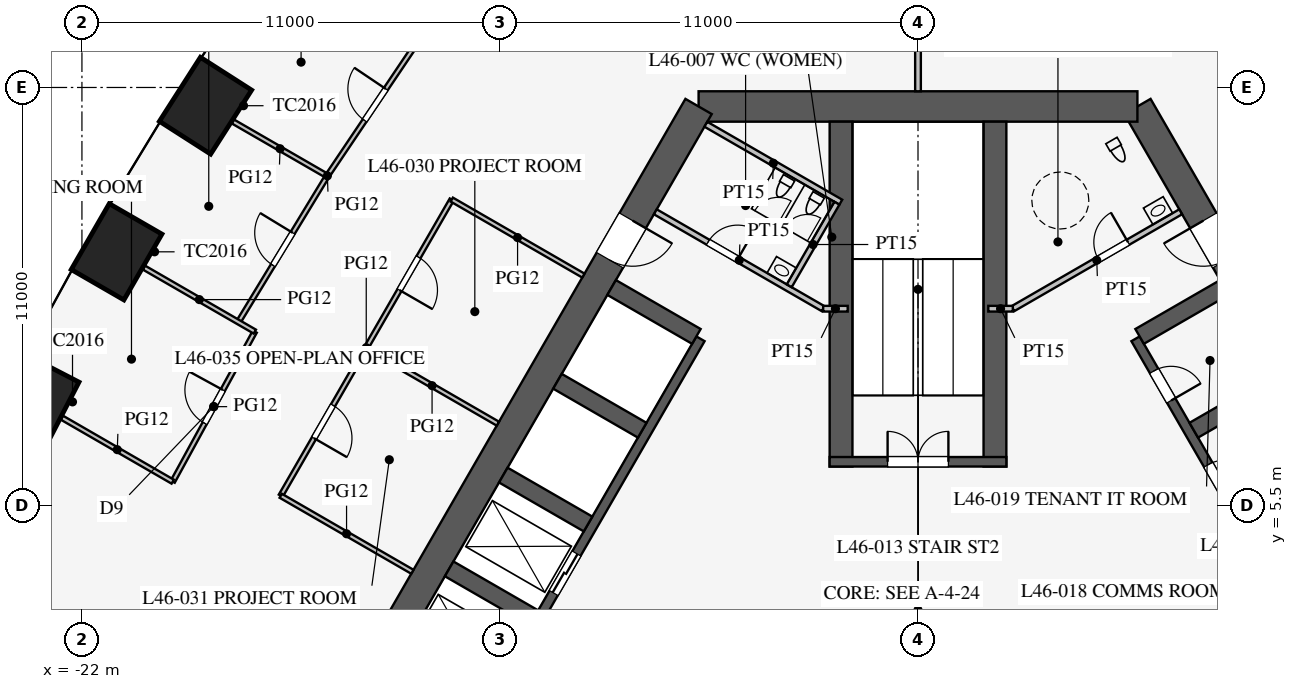
"""IFC4 building model, lengths in metres.
Left out: names, types, materials, properties, quantities, classifications, styles, units other than length and angle.
Written with IfcOpenShell. Run it as: python <this file> out.ifc"""

import sys

from ifc_helpers import new_model, si_unit, direction, frame, frame_2d, origin, origin_2d, place, context, subcontext, project, spatial, rectangle, extrude, element, fill, save


model = new_model("IFC4")
c1 = context("Model", 3, precision=1e-05, world=origin(), true_north=direction((0.0, 1.0)))
c2 = subcontext(c1, "Body", "Model", "MODEL_VIEW")
j1 = project(units=[si_unit("LENGTHUNIT", "METRE"), si_unit("PLANEANGLEUNIT", "RADIAN")], contexts=[c1])
p1 = place(None, origin())
s1 = spatial("IfcSite", under=j1, at=p1, CompositionType="ELEMENT")
p2 = place(p1, origin())
s2 = spatial("IfcBuilding", under=s1, at=p2, CompositionType="ELEMENT")
p3 = place(p2, frame((0.0, 0.0, 202.3)))
s3 = spatial("IfcBuildingStorey", under=s2, at=p3, CompositionType="ELEMENT", Elevation=202.3)
for number, where, z_axis, x_axis in (
    (1, (-18.748, 16.02, 0.0), (0.0, 0.0, 1.0), (-0.539, -0.842, 0.0)),
    (2, (-21.088, 12.175, 0.0), (0.0, 0.0, 1.0), (-0.5, -0.866, 0.0)),
    (3, (-23.248, 8.226, 0.0), (0.0, 0.0, 1.0), (-0.46, -0.888, 0.0)),
):
    element("IfcColumn", number, at=place(p3, frame(where, z_axis=z_axis, x_axis=x_axis)), inside=s3, PredefinedType="COLUMN", context=c2, shape_type="SweptSolid", body=[
        extrude(rectangle(XDim=2.0, YDim=1.6, at=origin_2d()), origin(), (0.0, 0.0, 1.0), 4.2),
    ])
p4 = place(p3, frame((16.743, -3.0, 0.0), z_axis=(0.0, 0.0, 1.0), x_axis=(-0.500002442456, 0.866023993627, 0.0)))
e4 = element("IfcWall", 4, at=p4, inside=s3, PredefinedType="SHEAR", context=c2, shape_type="SweptSolid", body=[
    extrude(rectangle(XDim=21.939, YDim=0.8, at=frame_2d((10.97, 0.0))), origin(), (0.0, 0.0, 1.0), 4.2),
])
p5 = place(p4, frame((17.27, 0.0, 0.0)))
e5 = element("IfcOpeningElement", 5, at=p5, cuts=e4, PredefinedType="OPENING", context=c2, shape_type="SweptSolid", body=[
    extrude(rectangle(XDim=1.2, YDim=2.1, at=frame_2d((0.6, 1.05))), frame((0.0, 0.41, 0.0), z_axis=(0.0, -1.0, 0.0), x_axis=(1.0, 0.0, 0.0)), (0.0, 0.0, 1.0), 0.82),
])
p6 = place(p4, frame((3.47, 0.0, 0.0)))
e6 = element("IfcOpeningElement", 6, at=p6, cuts=e4, PredefinedType="OPENING", context=c2, shape_type="SweptSolid", body=[
    extrude(rectangle(XDim=1.2, YDim=2.1, at=frame_2d((0.6, 1.05))), frame((0.0, 0.41, 0.0), z_axis=(0.0, -1.0, 0.0), x_axis=(1.0, 0.0, 0.0)), (0.0, 0.0, 1.0), 0.82),
])
p7 = place(p3, frame((5.773, 16.0, 0.0), z_axis=(0.0, 0.0, 1.0), x_axis=(-1.0, 0.0, 0.0)))
e7 = element("IfcWall", 7, at=p7, inside=s3, PredefinedType="SHEAR", context=c2, shape_type="SweptSolid", body=[
    extrude(rectangle(XDim=11.547, YDim=0.8, at=frame_2d((5.773, 0.0))), origin(), (0.0, 0.0, 1.0), 4.2),
])
p8 = place(p3, frame((-5.773, 16.0, 0.0), z_axis=(0.0, 0.0, 1.0), x_axis=(-0.500002442456, -0.866023993627, 0.0)))
e8 = element("IfcWall", 8, at=p8, inside=s3, PredefinedType="SHEAR", context=c2, shape_type="SweptSolid", body=[
    extrude(rectangle(XDim=21.939, YDim=0.8, at=frame_2d((10.97, 0.0))), origin(), (0.0, 0.0, 1.0), 4.2),
])
p9 = place(p8, frame((17.27, 0.0, 0.0)))
e9 = element("IfcOpeningElement", 9, at=p9, cuts=e8, PredefinedType="OPENING", context=c2, shape_type="SweptSolid", body=[
    extrude(rectangle(XDim=1.2, YDim=2.1, at=frame_2d((0.6, 1.05))), frame((0.0, 0.41, 0.0), z_axis=(0.0, -1.0, 0.0), x_axis=(1.0, 0.0, 0.0)), (0.0, 0.0, 1.0), 0.82),
])
p10 = place(p8, frame((3.47, 0.0, 0.0)))
e10 = element("IfcOpeningElement", 10, at=p10, cuts=e8, PredefinedType="OPENING", context=c2, shape_type="SweptSolid", body=[
    extrude(rectangle(XDim=1.2, YDim=2.1, at=frame_2d((0.6, 1.05))), frame((0.0, 0.41, 0.0), z_axis=(0.0, -1.0, 0.0), x_axis=(1.0, 0.0, 0.0)), (0.0, 0.0, 1.0), 0.82),
])
p11 = place(p3, frame((11.424, 0.014, 0.0), z_axis=(0.0, 0.0, 1.0), x_axis=(-0.500001763848, 0.866024385424, 0.0)))
e11 = element("IfcWall", 11, at=p11, inside=s3, PredefinedType="SHEAR", context=c2, shape_type="SweptSolid", body=[
    extrude(rectangle(XDim=11.4, YDim=0.25, at=frame_2d((5.7, 0.0))), origin(), (0.0, 0.0, 1.0), 4.2),
])
p12 = place(p11, frame((0.975, 0.0, 0.0)))
e12 = element("IfcOpeningElement", 12, at=p12, cuts=e11, PredefinedType="OPENING", context=c2, shape_type="SweptSolid", body=[
    extrude(rectangle(XDim=0.9, YDim=2.1, at=frame_2d((0.45, 1.05))), frame((0.0, 0.135, 0.0), z_axis=(0.0, -1.0, 0.0), x_axis=(1.0, 0.0, 0.0)), (0.0, 0.0, 1.0), 0.27),
])
p13 = place(p11, frame((3.825, 0.0, 0.0)))
e13 = element("IfcOpeningElement", 13, at=p13, cuts=e11, PredefinedType="OPENING", context=c2, shape_type="SweptSolid", body=[
    extrude(rectangle(XDim=0.9, YDim=2.1, at=frame_2d((0.45, 1.05))), frame((0.0, 0.135, 0.0), z_axis=(0.0, -1.0, 0.0), x_axis=(1.0, 0.0, 0.0)), (0.0, 0.0, 1.0), 0.27),
])
p14 = place(p11, frame((6.675, 0.0, 0.0)))
e14 = element("IfcOpeningElement", 14, at=p14, cuts=e11, PredefinedType="OPENING", context=c2, shape_type="SweptSolid", body=[
    extrude(rectangle(XDim=0.9, YDim=2.1, at=frame_2d((0.45, 1.05))), frame((0.0, 0.135, 0.0), z_axis=(0.0, -1.0, 0.0), x_axis=(1.0, 0.0, 0.0)), (0.0, 0.0, 1.0), 0.27),
])
p15 = place(p11, frame((9.525, 0.0, 0.0)))
e15 = element("IfcOpeningElement", 15, at=p15, cuts=e11, PredefinedType="OPENING", context=c2, shape_type="SweptSolid", body=[
    extrude(rectangle(XDim=0.9, YDim=2.1, at=frame_2d((0.45, 1.05))), frame((0.0, 0.135, 0.0), z_axis=(0.0, -1.0, 0.0), x_axis=(1.0, 0.0, 0.0)), (0.0, 0.0, 1.0), 0.27),
])
p16 = place(p3, frame((7.257, 7.481, 0.0), z_axis=(0.0, 0.0, 1.0), x_axis=(0.866046643894, 0.499963209246, 0.0)))
e16 = element("IfcWall", 16, at=p16, inside=s3, PredefinedType="SHEAR", context=c2, shape_type="SweptSolid", body=[
    extrude(rectangle(XDim=2.575, YDim=0.45, at=frame_2d((1.288, 0.0))), origin(), (0.0, 0.0, 1.0), 4.2),
])
p17 = place(p3, frame((5.832, 9.949, 0.0), z_axis=(0.0, 0.0, 1.0), x_axis=(0.866029291668, 0.499993265928, 0.0)))
e17 = element("IfcWall", 17, at=p17, inside=s3, PredefinedType="SHEAR", context=c2, shape_type="SweptSolid", body=[
    extrude(rectangle(XDim=2.575, YDim=0.45, at=frame_2d((1.288, 0.0))), origin(), (0.0, 0.0, 1.0), 4.2),
])
p18 = place(p3, frame((-5.724, 9.886, 0.0), z_axis=(0.0, 0.0, 1.0), x_axis=(-0.500001763848, -0.866024385424, 0.0)))
e18 = element("IfcWall", 18, at=p18, inside=s3, PredefinedType="SHEAR", context=c2, shape_type="SweptSolid", body=[
    extrude(rectangle(XDim=11.4, YDim=0.25, at=frame_2d((5.7, 0.0))), origin(), (0.0, 0.0, 1.0), 4.2),
])
p19 = place(p18, frame((6.525, 0.0, 0.0)))
e19 = element("IfcOpeningElement", 19, at=p19, cuts=e18, PredefinedType="OPENING", context=c2, shape_type="SweptSolid", body=[
    extrude(rectangle(XDim=1.2, YDim=2.2, at=frame_2d((0.6, 1.1))), frame((0.0, 0.135, 0.0), z_axis=(0.0, -1.0, 0.0), x_axis=(1.0, 0.0, 0.0)), (0.0, 0.0, 1.0), 0.27),
])
p20 = place(p18, frame((9.375, 0.0, 0.0)))
e20 = element("IfcOpeningElement", 20, at=p20, cuts=e18, PredefinedType="OPENING", context=c2, shape_type="SweptSolid", body=[
    extrude(rectangle(XDim=1.2, YDim=2.2, at=frame_2d((0.6, 1.1))), frame((0.0, 0.135, 0.0), z_axis=(0.0, -1.0, 0.0), x_axis=(1.0, 0.0, 0.0)), (0.0, 0.0, 1.0), 0.27),
])
p21 = place(p3, frame((-5.832, 9.949, 0.0), z_axis=(0.0, 0.0, 1.0), x_axis=(-0.866029291668, 0.499993265928, 0.0)))
e21 = element("IfcWall", 21, at=p21, inside=s3, PredefinedType="SHEAR", context=c2, shape_type="SweptSolid", body=[
    extrude(rectangle(XDim=2.575, YDim=0.45, at=frame_2d((1.288, 0.0))), origin(), (0.0, 0.0, 1.0), 4.2),
])
for number, where, z_axis, x_axis in (
    (22, (-7.257, 7.481, 0.0), (0.0, 0.0, 1.0), (-0.866, 0.5, 0.0)),
    (23, (-8.682, 5.012, 0.0), (0.0, 0.0, 1.0), (-0.866, 0.5, 0.0)),
    (24, (-10.107, 2.544, 0.0), (0.0, 0.0, 1.0), (-0.866, 0.5, 0.0)),
):
    element("IfcWall", number, at=place(p3, frame(where, z_axis=z_axis, x_axis=x_axis)), inside=s3, PredefinedType="SHEAR", context=c2, shape_type="SweptSolid", body=[
        extrude(rectangle(XDim=2.575, YDim=0.45, at=frame_2d((1.288, 0.0))), origin(), (0.0, 0.0, 1.0), 4.2),
    ])
for number, where, z_axis, x_axis in (
    (25, (2.025, 6.525, 0.0), (0.0, 0.0, 1.0), (0.0, 1.0, 0.0)),
    (26, (-2.025, 6.525, 0.0), (0.0, 0.0, 1.0), (0.0, 1.0, 0.0)),
):
    element("IfcWall", number, at=place(p3, frame(where, z_axis=z_axis, x_axis=x_axis)), inside=s3, PredefinedType="SHEAR", context=c2, shape_type="SweptSolid", body=[
        extrude(rectangle(XDim=9.075, YDim=0.6, at=frame_2d((4.538, 0.0))), origin(), (0.0, 0.0, 1.0), 4.2),
    ])
p22 = place(p3, frame((2.325, 6.65, 0.0), z_axis=(0.0, 0.0, 1.0), x_axis=(-1.0, 0.0, 0.0)))
e27 = element("IfcWall", 27, at=p22, inside=s3, PredefinedType="SHEAR", context=c2, shape_type="SweptSolid", body=[
    extrude(rectangle(XDim=4.65, YDim=0.25, at=frame_2d((2.325, 0.0))), origin(), (0.0, 0.0, 1.0), 4.2),
])
p23 = place(p22, frame((1.525, 0.0, 0.0)))
e28 = element("IfcOpeningElement", 28, at=p23, cuts=e27, PredefinedType="OPENING", context=c2, shape_type="SweptSolid", body=[
    extrude(rectangle(XDim=1.6, YDim=2.1, at=frame_2d((0.8, 1.05))), frame((0.0, 0.135, 0.0), z_axis=(0.0, -1.0, 0.0), x_axis=(1.0, 0.0, 0.0)), (0.0, 0.0, 1.0), 0.27),
])
p24 = place(p3, frame((2.495, 10.678, 0.0), z_axis=(0.0, 0.0, 1.0), x_axis=(0.86602216432, 0.500005610874, 0.0)))
e29 = element("IfcWall", 29, at=p24, inside=s3, PredefinedType="PARTITIONING", context=c2, shape_type="SweptSolid", body=[
    extrude(rectangle(XDim=5.1, YDim=0.15, at=frame_2d((2.55, 0.0))), origin(), (0.0, 0.0, 1.0), 4.0),
])
p25 = place(p24, frame((2.6, 0.0, 0.0)))
e30 = element("IfcOpeningElement", 30, at=p25, cuts=e29, PredefinedType="OPENING", context=c2, shape_type="SweptSolid", body=[
    extrude(rectangle(XDim=0.9, YDim=2.1, at=frame_2d((0.45, 1.05))), frame((0.0, 0.085, 0.0), z_axis=(0.0, -1.0, 0.0), x_axis=(1.0, 0.0, 0.0)), (0.0, 0.0, 1.0), 0.17),
])
p26 = place(p3, frame((-2.495, 10.678, 0.0), z_axis=(0.0, 0.0, 1.0), x_axis=(-0.86602216432, 0.500005610874, 0.0)))
e31 = element("IfcWall", 31, at=p26, inside=s3, PredefinedType="PARTITIONING", context=c2, shape_type="SweptSolid", body=[
    extrude(rectangle(XDim=5.1, YDim=0.15, at=frame_2d((2.55, 0.0))), origin(), (0.0, 0.0, 1.0), 4.0),
])
p27 = place(p26, frame((2.6, 0.0, 0.0)))
e32 = element("IfcOpeningElement", 32, at=p27, cuts=e31, PredefinedType="OPENING", context=c2, shape_type="SweptSolid", body=[
    extrude(rectangle(XDim=0.9, YDim=2.1, at=frame_2d((0.45, 1.05))), frame((0.0, 0.085, 0.0), z_axis=(0.0, -1.0, 0.0), x_axis=(1.0, 0.0, 0.0)), (0.0, 0.0, 1.0), 0.17),
])
for number, where, z_axis, x_axis in (
    (33, (2.495, 10.678, 0.0), (0.0, 0.0, 1.0), (-1.0, 0.0, 0.0)),
    (34, (-2.495, 10.678, 0.0), (0.0, 0.0, 1.0), (1.0, 0.0, 0.0)),
):
    element("IfcWall", number, at=place(p3, frame(where, z_axis=z_axis, x_axis=x_axis)), inside=s3, PredefinedType="PARTITIONING", context=c2, shape_type="SweptSolid", body=[
        extrude(rectangle(XDim=0.645, YDim=0.15, at=frame_2d((0.323, 0.0))), origin(), (0.0, 0.0, 1.0), 4.0),
    ])
p28 = place(p3, frame((-2.031, 13.482, 0.0), z_axis=(0.0, 0.0, 1.0), x_axis=(-0.866050731258, 0.499956128963, 0.0)))
e35 = element("IfcWall", 35, at=p28, inside=s3, PredefinedType="PARTITIONING", context=c2, shape_type="SweptSolid", body=[
    extrude(rectangle(XDim=4.1, YDim=0.15, at=frame_2d((2.05, 0.0))), origin(), (0.0, 0.0, 1.0), 4.0),
])
p29 = place(p3, frame((-3.389, 11.281, 0.0), z_axis=(0.0, 0.0, 1.0), x_axis=(0.499989096993, 0.866031698547, 0.0)))
e36 = element("IfcWall", 36, at=p29, inside=s3, PredefinedType="PARTITIONING", context=c2, shape_type="SweptSolid", body=[
    extrude(rectangle(XDim=2.51, YDim=0.15, at=frame_2d((1.255, 0.0))), origin(), (0.0, 0.0, 1.0), 4.0),
])
p30 = place(p3, frame((0.0, 16.4, 0.0), z_axis=(0.0, 0.0, 1.0), x_axis=(0.0, 1.0, 0.0)))
e37 = element("IfcWall", 37, at=p30, inside=s3, PredefinedType="PARTITIONING", context=c2, shape_type="SweptSolid", body=[
    extrude(rectangle(XDim=14.95, YDim=0.15, at=frame_2d((7.475, 0.0))), origin(), (0.0, 0.0, 1.0), 2.4),
])
p31 = place(p3, frame((-14.519, 9.653, 0.0), z_axis=(0.0, 0.0, 1.0), x_axis=(-0.500013631625, -0.866017533419, 0.0)))
e38 = element("IfcWall", 38, at=p31, inside=s3, PredefinedType="PARTITIONING", context=c2, shape_type="SweptSolid", body=[
    extrude(rectangle(XDim=4.5, YDim=0.12, at=frame_2d((2.25, 0.0))), origin(), (0.0, 0.0, 1.0), 2.9),
])
p32 = place(p31, frame((1.75, 0.0, 0.15)))
e39 = element("IfcOpeningElement", 39, at=p32, cuts=e38, PredefinedType="OPENING", context=c2, shape_type="SweptSolid", body=[
    extrude(rectangle(XDim=1.0, YDim=2.1, at=frame_2d((0.5, 1.05))), frame((0.0, 0.07, 0.0), z_axis=(0.0, -1.0, 0.0), x_axis=(1.0, 0.0, 0.0)), (0.0, 0.0, 1.0), 0.14),
])
p33 = place(p3, frame((-12.269, 13.55, 0.0), z_axis=(0.0, 0.0, 1.0), x_axis=(-0.499990139034, -0.866031096941, 0.0)))
e40 = element("IfcWall", 40, at=p33, inside=s3, PredefinedType="PARTITIONING", context=c2, shape_type="SweptSolid", body=[
    extrude(rectangle(XDim=4.5, YDim=0.12, at=frame_2d((2.25, 0.0))), origin(), (0.0, 0.0, 1.0), 2.9),
])
p34 = place(p33, frame((1.75, 0.0, 0.15)))
e41 = element("IfcOpeningElement", 41, at=p34, cuts=e40, PredefinedType="OPENING", context=c2, shape_type="SweptSolid", body=[
    extrude(rectangle(XDim=1.0, YDim=2.1, at=frame_2d((0.5, 1.05))), frame((0.0, 0.07, 0.0), z_axis=(0.0, -1.0, 0.0), x_axis=(1.0, 0.0, 0.0)), (0.0, 0.0, 1.0), 0.14),
])
for number, where, z_axis, x_axis in (
    (42, (-13.305, 3.756, 0.0), (0.0, 0.0, 1.0), (-0.866, 0.5, 0.0)),
    (43, (-11.055, 7.653, 0.0), (0.0, 0.0, 1.0), (-0.866, 0.5, 0.0)),
    (44, (-8.805, 11.55, 0.0), (0.0, 0.0, 1.0), (-0.866, 0.5, 0.0)),
):
    element("IfcWall", number, at=place(p3, frame(where, z_axis=z_axis, x_axis=x_axis)), inside=s3, PredefinedType="PARTITIONING", context=c2, shape_type="SweptSolid", body=[
        extrude(rectangle(XDim=4.0, YDim=0.12, at=frame_2d((2.0, 0.0))), origin(), (0.0, 0.0, 1.0), 2.9),
    ])
p35 = place(p3, frame((-17.451, 10.075, 0.0), z_axis=(0.0, 0.0, 1.0), x_axis=(-0.479949984371, -0.877295852322, 0.0)))
e45 = element("IfcWall", 45, at=p35, inside=s3, PredefinedType="PARTITIONING", context=c2, shape_type="SweptSolid", body=[
    extrude(rectangle(XDim=4.501, YDim=0.12, at=frame_2d((2.25, 0.0))), origin(), (0.0, 0.0, 1.0), 2.9),
])
p36 = place(p35, frame((1.75, 0.0, 0.15)))
e46 = element("IfcOpeningElement", 46, at=p36, cuts=e45, PredefinedType="OPENING", context=c2, shape_type="SweptSolid", body=[
    extrude(rectangle(XDim=1.0, YDim=2.1, at=frame_2d((0.5, 1.05))), frame((0.0, 0.07, 0.0), z_axis=(0.0, -1.0, 0.0), x_axis=(1.0, 0.0, 0.0)), (0.0, 0.0, 1.0), 0.14),
])
p37 = place(p3, frame((-15.544, 14.171, 0.0), z_axis=(0.0, 0.0, 1.0), x_axis=(-0.519790350351, -0.85429385558, 0.0)))
e47 = element("IfcWall", 47, at=p37, inside=s3, PredefinedType="PARTITIONING", context=c2, shape_type="SweptSolid", body=[
    extrude(rectangle(XDim=4.501, YDim=0.12, at=frame_2d((2.25, 0.0))), origin(), (0.0, 0.0, 1.0), 2.9),
])
p38 = place(p37, frame((1.75, 0.0, 0.15)))
e48 = element("IfcOpeningElement", 48, at=p38, cuts=e47, PredefinedType="OPENING", context=c2, shape_type="SweptSolid", body=[
    extrude(rectangle(XDim=1.0, YDim=2.1, at=frame_2d((0.5, 1.05))), frame((0.0, 0.07, 0.0), z_axis=(0.0, -1.0, 0.0), x_axis=(1.0, 0.0, 0.0)), (0.0, 0.0, 1.0), 0.14),
])
p39 = place(p3, frame((-13.025, 17.912, 0.0), z_axis=(0.0, 0.0, 1.0), x_axis=(-0.55850386778, -0.829501916619, 0.0)))
e49 = element("IfcWall", 49, at=p39, inside=s3, PredefinedType="PARTITIONING", context=c2, shape_type="SweptSolid", body=[
    extrude(rectangle(XDim=4.511, YDim=0.12, at=frame_2d((2.255, 0.0))), origin(), (0.0, 0.0, 1.0), 2.9),
])
p40 = place(p39, frame((1.75, 0.0, 0.15)))
e50 = element("IfcOpeningElement", 50, at=p40, cuts=e49, PredefinedType="OPENING", context=c2, shape_type="SweptSolid", body=[
    extrude(rectangle(XDim=1.0, YDim=2.1, at=frame_2d((0.5, 1.05))), frame((0.0, 0.07, 0.0), z_axis=(0.0, -1.0, 0.0), x_axis=(1.0, 0.0, 0.0)), (0.0, 0.0, 1.0), 0.14),
])
p41 = place(p3, frame((-17.451, 10.075, 0.0), z_axis=(0.0, 0.0, 1.0), x_axis=(-0.866045641059, 0.499964946374, 0.0)))
e51 = element("IfcWall", 51, at=p41, inside=s3, PredefinedType="PARTITIONING", context=c2, shape_type="SweptSolid", body=[
    extrude(rectangle(XDim=3.37, YDim=0.12, at=frame_2d((1.685, 0.0))), origin(), (0.0, 0.0, 1.0), 2.9),
])
p42 = place(p3, frame((-19.611, 6.126, 0.0), z_axis=(0.0, 0.0, 1.0), x_axis=(-0.866031085144, 0.499990159468, 0.0)))
e52 = element("IfcWall", 52, at=p42, inside=s3, PredefinedType="PARTITIONING", context=c2, shape_type="SweptSolid", body=[
    extrude(rectangle(XDim=3.368, YDim=0.12, at=frame_2d((1.684, 0.0))), origin(), (0.0, 0.0, 1.0), 2.9),
])
p43 = place(p3, frame((-15.544, 14.171, 0.0), z_axis=(0.0, 0.0, 1.0), x_axis=(-0.865987130335, 0.500066285701, 0.0)))
e53 = element("IfcWall", 53, at=p43, inside=s3, PredefinedType="PARTITIONING", context=c2, shape_type="SweptSolid", body=[
    extrude(rectangle(XDim=2.868, YDim=0.12, at=frame_2d((1.434, 0.0))), origin(), (0.0, 0.0, 1.0), 2.9),
])
p44 = place(p25, origin())
e54 = element("IfcDoor", 54, at=p44, inside=s3, OperationType="SINGLE_SWING_RIGHT", PredefinedType="DOOR", context=c2, shape_type="SweptSolid", body=[
    extrude(rectangle(XDim=0.9, YDim=2.1, at=frame_2d((0.45, 1.05))), frame((0.0, 0.025, 0.0), z_axis=(0.0, -1.0, 0.0), x_axis=(1.0, 0.0, 0.0)), (0.0, 0.0, 1.0), 0.05),
])
fill(e30, e54)
p45 = place(p27, frame((0.9, 0.0, 0.0), z_axis=(0.0, 0.0, 1.0), x_axis=(-1.0, 0.0, 0.0)))
e55 = element("IfcDoor", 55, at=p45, inside=s3, OperationType="SINGLE_SWING_RIGHT", PredefinedType="DOOR", context=c2, shape_type="SweptSolid", body=[
    extrude(rectangle(XDim=0.9, YDim=2.1, at=frame_2d((0.45, 1.05))), frame((0.0, 0.025, 0.0), z_axis=(0.0, -1.0, 0.0), x_axis=(1.0, 0.0, 0.0)), (0.0, 0.0, 1.0), 0.05),
])
fill(e32, e55)
p46 = place(p23, frame((1.6, 0.0, 0.0), z_axis=(0.0, 0.0, 1.0), x_axis=(-1.0, 0.0, 0.0)))
e56 = element("IfcDoor", 56, at=p46, inside=s3, OperationType="DOUBLE_DOOR_SINGLE_SWING", PredefinedType="DOOR", context=c2, shape_type="SweptSolid", body=[
    extrude(rectangle(XDim=1.6, YDim=2.1, at=frame_2d((0.8, 1.05))), frame((0.0, 0.025, 0.0), z_axis=(0.0, -1.0, 0.0), x_axis=(1.0, 0.0, 0.0)), (0.0, 0.0, 1.0), 0.05),
])
fill(e28, e56)
p47 = place(p5, origin())
e57 = element("IfcDoor", 57, at=p47, inside=s3, OperationType="SINGLE_SWING_RIGHT", PredefinedType="DOOR", context=c2, shape_type="SweptSolid", body=[
    extrude(rectangle(XDim=1.2, YDim=2.1, at=frame_2d((0.6, 1.05))), frame((0.0, 0.025, 0.0), z_axis=(0.0, -1.0, 0.0), x_axis=(1.0, 0.0, 0.0)), (0.0, 0.0, 1.0), 0.05),
])
fill(e5, e57)
p48 = place(p10, origin())
e58 = element("IfcDoor", 58, at=p48, inside=s3, OperationType="SINGLE_SWING_LEFT", PredefinedType="DOOR", context=c2, shape_type="SweptSolid", body=[
    extrude(rectangle(XDim=1.2, YDim=2.1, at=frame_2d((0.6, 1.05))), frame((0.0, 0.025, 0.0), z_axis=(0.0, -1.0, 0.0), x_axis=(1.0, 0.0, 0.0)), (0.0, 0.0, 1.0), 0.05),
])
fill(e10, e58)
p49 = place(p14, frame((0.9, 0.0, 0.0), z_axis=(0.0, 0.0, 1.0), x_axis=(-1.0, 0.0, 0.0)))
e59 = element("IfcDoor", 59, at=p49, inside=s3, OperationType="SINGLE_SWING_RIGHT", PredefinedType="DOOR", context=c2, shape_type="SweptSolid", body=[
    extrude(rectangle(XDim=0.9, YDim=2.1, at=frame_2d((0.45, 1.05))), frame((0.0, 0.025, 0.0), z_axis=(0.0, -1.0, 0.0), x_axis=(1.0, 0.0, 0.0)), (0.0, 0.0, 1.0), 0.05),
])
fill(e14, e59)
p50 = place(p15, frame((0.9, 0.0, 0.0), z_axis=(0.0, 0.0, 1.0), x_axis=(-1.0, 0.0, 0.0)))
e60 = element("IfcDoor", 60, at=p50, inside=s3, OperationType="SINGLE_SWING_RIGHT", PredefinedType="DOOR", context=c2, shape_type="SweptSolid", body=[
    extrude(rectangle(XDim=0.9, YDim=2.1, at=frame_2d((0.45, 1.05))), frame((0.0, 0.025, 0.0), z_axis=(0.0, -1.0, 0.0), x_axis=(1.0, 0.0, 0.0)), (0.0, 0.0, 1.0), 0.05),
])
fill(e15, e60)
p51 = place(p34, origin())
e61 = element("IfcDoor", 61, at=p51, inside=s3, OperationType="SINGLE_SWING_RIGHT", PredefinedType="DOOR", context=c2, shape_type="SweptSolid", body=[
    extrude(rectangle(XDim=1.0, YDim=2.1, at=frame_2d((0.5, 1.05))), frame((0.0, 0.025, 0.0), z_axis=(0.0, -1.0, 0.0), x_axis=(1.0, 0.0, 0.0)), (0.0, 0.0, 1.0), 0.05),
])
fill(e41, e61)
p52 = place(p32, origin())
e62 = element("IfcDoor", 62, at=p52, inside=s3, OperationType="SINGLE_SWING_RIGHT", PredefinedType="DOOR", context=c2, shape_type="SweptSolid", body=[
    extrude(rectangle(XDim=1.0, YDim=2.1, at=frame_2d((0.5, 1.05))), frame((0.0, 0.025, 0.0), z_axis=(0.0, -1.0, 0.0), x_axis=(1.0, 0.0, 0.0)), (0.0, 0.0, 1.0), 0.05),
])
fill(e39, e62)
p53 = place(p40, frame((1.0, 0.0, 0.0), z_axis=(0.0, 0.0, 1.0), x_axis=(-1.0, 0.0, 0.0)))
e63 = element("IfcDoor", 63, at=p53, inside=s3, OperationType="SINGLE_SWING_RIGHT", PredefinedType="DOOR", context=c2, shape_type="SweptSolid", body=[
    extrude(rectangle(XDim=1.0, YDim=2.1, at=frame_2d((0.5, 1.05))), frame((0.0, 0.025, 0.0), z_axis=(0.0, -1.0, 0.0), x_axis=(1.0, 0.0, 0.0)), (0.0, 0.0, 1.0), 0.05),
])
fill(e50, e63)
p54 = place(p38, frame((1.0, 0.0, 0.0), z_axis=(0.0, 0.0, 1.0), x_axis=(-1.0, 0.0, 0.0)))
e64 = element("IfcDoor", 64, at=p54, inside=s3, OperationType="SINGLE_SWING_RIGHT", PredefinedType="DOOR", context=c2, shape_type="SweptSolid", body=[
    extrude(rectangle(XDim=1.0, YDim=2.1, at=frame_2d((0.5, 1.05))), frame((0.0, 0.025, 0.0), z_axis=(0.0, -1.0, 0.0), x_axis=(1.0, 0.0, 0.0)), (0.0, 0.0, 1.0), 0.05),
])
fill(e48, e64)
p55 = place(p36, frame((1.0, 0.0, 0.0), z_axis=(0.0, 0.0, 1.0), x_axis=(-1.0, 0.0, 0.0)))
e65 = element("IfcDoor", 65, at=p55, inside=s3, OperationType="SINGLE_SWING_RIGHT", PredefinedType="DOOR", context=c2, shape_type="SweptSolid", body=[
    extrude(rectangle(XDim=1.0, YDim=2.1, at=frame_2d((0.5, 1.05))), frame((0.0, 0.025, 0.0), z_axis=(0.0, -1.0, 0.0), x_axis=(1.0, 0.0, 0.0)), (0.0, 0.0, 1.0), 0.05),
])
fill(e46, e65)
p56 = place(p19, origin())
e66 = element("IfcDoor", 66, at=p56, inside=s3, OperationType="DOUBLE_DOOR_SLIDING", PredefinedType="DOOR", context=c2, shape_type="SweptSolid", body=[
    extrude(rectangle(XDim=1.2, YDim=2.2, at=frame_2d((0.6, 1.1))), frame((0.0, 0.025, 0.0), z_axis=(0.0, -1.0, 0.0), x_axis=(1.0, 0.0, 0.0)), (0.0, 0.0, 1.0), 0.05),
])
fill(e19, e66)
save(model, sys.argv[1])
